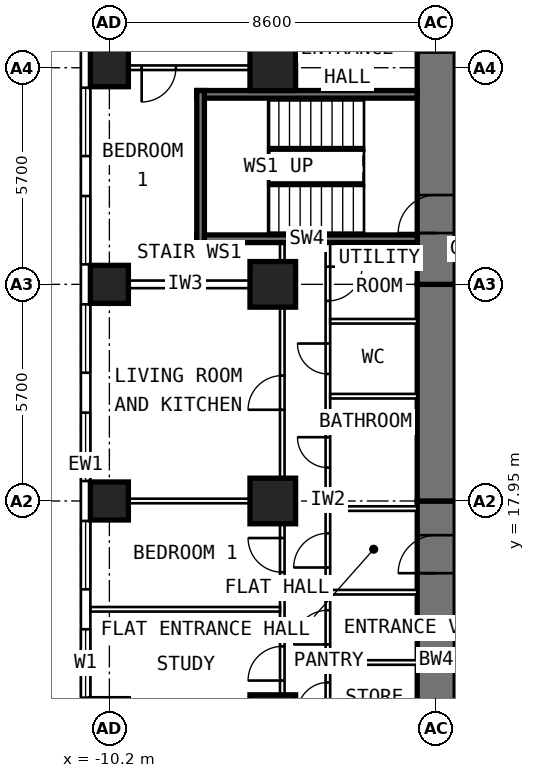
"""IFC4 building model, lengths in metres.
Left out: names, types, materials, properties, quantities, classifications, styles, units other than length and angle.
Written with IfcOpenShell. Run it as: python <this file> out.ifc"""

import sys

from ifc_helpers import new_model, si_unit, direction, frame, frame_2d, origin, origin_2d, place, context, subcontext, project, spatial, rectangle, extrude, element, fill, save


model = new_model("IFC4")
c1 = context("Model", 3, precision=1e-05, world=origin(), true_north=direction((0.0, 1.0)))
c2 = subcontext(c1, "Body", "Model", "MODEL_VIEW")
j1 = project(units=[si_unit("LENGTHUNIT", "METRE"), si_unit("PLANEANGLEUNIT", "RADIAN")], contexts=[c1])
p1 = place(None, origin())
s1 = spatial("IfcSite", under=j1, at=p1, CompositionType="ELEMENT")
p2 = place(p1, origin())
s2 = spatial("IfcBuilding", under=s1, at=p2, CompositionType="ELEMENT")
p3 = place(p2, frame((0.0, 0.0, 53.8)))
s3 = spatial("IfcBuildingStorey", under=s2, at=p3, CompositionType="ELEMENT", Elevation=53.8)
for number, where, z_axis, x_axis in (
    (1, (-10.2, 17.95, 0.0), (0.0, 0.0, 1.0), (0.0, 1.0, 0.0)),
    (2, (-10.2, 23.65, 0.0), (0.0, 0.0, 1.0), (0.0, 1.0, 0.0)),
    (3, (-10.2, 29.35, 0.0), (0.0, 0.0, 1.0), (0.0, 1.0, 0.0)),
):
    element("IfcColumn", number, at=place(p3, frame(where, z_axis=z_axis, x_axis=x_axis)), inside=s3, PredefinedType="COLUMN", context=c2, shape_type="SweptSolid", body=[
        extrude(rectangle(XDim=1.0, YDim=1.0, at=origin_2d()), origin(), (0.0, 0.0, 1.0), 3.6),
    ])
for number, where, z_axis, x_axis in (
    (4, (-5.9, 12.25, 0.0), (0.0, 0.0, 1.0), (0.0, 1.0, 0.0)),
    (5, (-5.9, 17.95, 0.0), (0.0, 0.0, 1.0), (0.0, 1.0, 0.0)),
    (6, (-5.9, 23.65, 0.0), (0.0, 0.0, 1.0), (0.0, 1.0, 0.0)),
    (7, (-5.9, 29.35, 0.0), (0.0, 0.0, 1.0), (0.0, 1.0, 0.0)),
):
    element("IfcColumn", number, at=place(p3, frame(where, z_axis=z_axis, x_axis=x_axis)), inside=s3, PredefinedType="COLUMN", context=c2, shape_type="SweptSolid", body=[
        extrude(rectangle(XDim=1.2, YDim=1.2, at=origin_2d()), origin(), (0.0, 0.0, 1.0), 3.6),
    ])
p4 = place(p3, frame((-1.6, 9.6, 0.0), z_axis=(0.0, 0.0, 1.0), x_axis=(0.0, 1.0, 0.0)))
e8 = element("IfcWall", 8, at=p4, inside=s3, PredefinedType="SHEAR", context=c2, shape_type="SweptSolid", body=[
    extrude(rectangle(XDim=8.35, YDim=1.0, at=frame_2d((4.175, 0.0))), origin(), (0.0, 0.0, 1.0), 3.6),
])
p5 = place(p4, frame((6.45, 0.0, 0.0)))
e9 = element("IfcOpeningElement", 9, at=p5, cuts=e8, PredefinedType="OPENING", context=c2, shape_type="SweptSolid", body=[
    extrude(rectangle(XDim=1.0, YDim=2.1, at=frame_2d((0.5, 1.05))), frame((0.0, 0.512, 0.0), z_axis=(0.0, -1.0, 0.0), x_axis=(1.0, 0.0, 0.0)), (0.0, 0.0, 1.0), 1.024),
])
p6 = place(p3, frame((-1.6, 17.95, 0.0), z_axis=(0.0, 0.0, 1.0), x_axis=(0.0, 1.0, 0.0)))
e10 = element("IfcWall", 10, at=p6, inside=s3, PredefinedType="SHEAR", context=c2, shape_type="SweptSolid", body=[
    extrude(rectangle(XDim=5.7, YDim=1.0, at=frame_2d((2.85, 0.0))), origin(), (0.0, 0.0, 1.0), 3.6),
])
p7 = place(p3, frame((-1.6, 23.65, 0.0), z_axis=(0.0, 0.0, 1.0), x_axis=(0.0, 1.0, 0.0)))
e11 = element("IfcWall", 11, at=p7, inside=s3, PredefinedType="SHEAR", context=c2, shape_type="SweptSolid", body=[
    extrude(rectangle(XDim=10.745, YDim=1.0, at=frame_2d((5.373, 0.0))), origin(), (0.0, 0.0, 1.0), 3.6),
])
p8 = place(p7, frame((6.1, 0.0, 0.0)))
e12 = element("IfcOpeningElement", 12, at=p8, cuts=e11, PredefinedType="OPENING", context=c2, shape_type="SweptSolid", body=[
    extrude(rectangle(XDim=1.0, YDim=2.1, at=frame_2d((0.5, 1.05))), frame((0.0, 0.512, 0.0), z_axis=(0.0, -1.0, 0.0), x_axis=(1.0, 0.0, 0.0)), (0.0, 0.0, 1.0), 1.024),
])
p9 = place(p7, frame((1.35, 0.0, 0.0)))
e13 = element("IfcOpeningElement", 13, at=p9, cuts=e11, PredefinedType="OPENING", context=c2, shape_type="SweptSolid", body=[
    extrude(rectangle(XDim=1.0, YDim=2.1, at=frame_2d((0.5, 1.05))), frame((0.0, 0.512, 0.0), z_axis=(0.0, -1.0, 0.0), x_axis=(1.0, 0.0, 0.0)), (0.0, 0.0, 1.0), 1.024),
])
p10 = place(p3, frame((-10.825, 6.148, 0.0), z_axis=(0.0, 0.0, 1.0), x_axis=(0.0, 1.0, 0.0)))
e14 = element("IfcWall", 14, at=p10, inside=s3, PredefinedType="SOLIDWALL", context=c2, shape_type="SweptSolid", body=[
    extrude(rectangle(XDim=25.487, YDim=0.25, at=frame_2d((12.744, 0.0))), origin(), (0.0, 0.0, 1.0), 3.35),
])
p11 = place(p10, frame((0.927, 0.0, 0.8)))
e15 = element("IfcOpeningElement", 15, at=p11, cuts=e14, PredefinedType="OPENING", context=c2, shape_type="SweptSolid", body=[
    extrude(rectangle(XDim=1.8, YDim=1.8, at=frame_2d((0.9, 0.9))), frame((0.0, 0.137, 0.0), z_axis=(0.0, -1.0, 0.0), x_axis=(1.0, 0.0, 0.0)), (0.0, 0.0, 1.0), 0.274),
])
p12 = place(p10, frame((3.777, 0.0, 0.8)))
e16 = element("IfcOpeningElement", 16, at=p12, cuts=e14, PredefinedType="OPENING", context=c2, shape_type="SweptSolid", body=[
    extrude(rectangle(XDim=1.8, YDim=1.8, at=frame_2d((0.9, 0.9))), frame((0.0, 0.137, 0.0), z_axis=(0.0, -1.0, 0.0), x_axis=(1.0, 0.0, 0.0)), (0.0, 0.0, 1.0), 0.274),
])
p13 = place(p10, frame((6.627, 0.0, 0.8)))
e17 = element("IfcOpeningElement", 17, at=p13, cuts=e14, PredefinedType="OPENING", context=c2, shape_type="SweptSolid", body=[
    extrude(rectangle(XDim=1.8, YDim=1.8, at=frame_2d((0.9, 0.9))), frame((0.0, 0.137, 0.0), z_axis=(0.0, -1.0, 0.0), x_axis=(1.0, 0.0, 0.0)), (0.0, 0.0, 1.0), 0.274),
])
p14 = place(p10, frame((9.477, 0.0, 0.8)))
e18 = element("IfcOpeningElement", 18, at=p14, cuts=e14, PredefinedType="OPENING", context=c2, shape_type="SweptSolid", body=[
    extrude(rectangle(XDim=1.8, YDim=1.8, at=frame_2d((0.9, 0.9))), frame((0.0, 0.137, 0.0), z_axis=(0.0, -1.0, 0.0), x_axis=(1.0, 0.0, 0.0)), (0.0, 0.0, 1.0), 0.274),
])
p15 = place(p10, frame((12.327, 0.0, 0.8)))
e19 = element("IfcOpeningElement", 19, at=p15, cuts=e14, PredefinedType="OPENING", context=c2, shape_type="SweptSolid", body=[
    extrude(rectangle(XDim=1.8, YDim=1.8, at=frame_2d((0.9, 0.9))), frame((0.0, 0.137, 0.0), z_axis=(0.0, -1.0, 0.0), x_axis=(1.0, 0.0, 0.0)), (0.0, 0.0, 1.0), 0.274),
])
p16 = place(p10, frame((15.177, 0.0, 0.8)))
e20 = element("IfcOpeningElement", 20, at=p16, cuts=e14, PredefinedType="OPENING", context=c2, shape_type="SweptSolid", body=[
    extrude(rectangle(XDim=1.8, YDim=1.8, at=frame_2d((0.9, 0.9))), frame((0.0, 0.137, 0.0), z_axis=(0.0, -1.0, 0.0), x_axis=(1.0, 0.0, 0.0)), (0.0, 0.0, 1.0), 0.274),
])
p17 = place(p10, frame((18.027, 0.0, 0.8)))
e21 = element("IfcOpeningElement", 21, at=p17, cuts=e14, PredefinedType="OPENING", context=c2, shape_type="SweptSolid", body=[
    extrude(rectangle(XDim=1.8, YDim=1.8, at=frame_2d((0.9, 0.9))), frame((0.0, 0.137, 0.0), z_axis=(0.0, -1.0, 0.0), x_axis=(1.0, 0.0, 0.0)), (0.0, 0.0, 1.0), 0.274),
])
p18 = place(p10, frame((20.877, 0.0, 0.8)))
e22 = element("IfcOpeningElement", 22, at=p18, cuts=e14, PredefinedType="OPENING", context=c2, shape_type="SweptSolid", body=[
    extrude(rectangle(XDim=1.8, YDim=1.8, at=frame_2d((0.9, 0.9))), frame((0.0, 0.137, 0.0), z_axis=(0.0, -1.0, 0.0), x_axis=(1.0, 0.0, 0.0)), (0.0, 0.0, 1.0), 0.274),
])
p19 = place(p3, frame((-4.45, 10.1, 0.0), z_axis=(0.0, 0.0, 1.0), x_axis=(0.0, 1.0, 0.0)))
e23 = element("IfcWall", 23, at=p19, inside=s3, PredefinedType="PARTITIONING", context=c2, shape_type="SweptSolid", body=[
    extrude(rectangle(XDim=14.65, YDim=0.12, at=frame_2d((7.325, 0.0))), origin(), (0.0, 0.0, 1.0), 3.35),
])
p20 = place(p19, frame((0.375, 0.0, 0.0)))
e24 = element("IfcOpeningElement", 24, at=p20, cuts=e23, PredefinedType="OPENING", context=c2, shape_type="SweptSolid", body=[
    extrude(rectangle(XDim=0.9, YDim=2.1, at=frame_2d((0.45, 1.05))), frame((0.0, 0.072, 0.0), z_axis=(0.0, -1.0, 0.0), x_axis=(1.0, 0.0, 0.0)), (0.0, 0.0, 1.0), 0.144),
])
p21 = place(p19, frame((2.275, 0.0, 0.0)))
e25 = element("IfcOpeningElement", 25, at=p21, cuts=e23, PredefinedType="OPENING", context=c2, shape_type="SweptSolid", body=[
    extrude(rectangle(XDim=0.8, YDim=2.1, at=frame_2d((0.4, 1.05))), frame((0.0, 0.072, 0.0), z_axis=(0.0, -1.0, 0.0), x_axis=(1.0, 0.0, 0.0)), (0.0, 0.0, 1.0), 0.144),
])
p22 = place(p19, frame((4.075, 0.0, 0.0)))
e26 = element("IfcOpeningElement", 26, at=p22, cuts=e23, PredefinedType="OPENING", context=c2, shape_type="SweptSolid", body=[
    extrude(rectangle(XDim=0.9, YDim=2.1, at=frame_2d((0.45, 1.05))), frame((0.0, 0.072, 0.0), z_axis=(0.0, -1.0, 0.0), x_axis=(1.0, 0.0, 0.0)), (0.0, 0.0, 1.0), 0.144),
])
p23 = place(p19, frame((6.1, 0.0, 0.0)))
e27 = element("IfcOpeningElement", 27, at=p23, cuts=e23, PredefinedType="OPENING", context=c2, shape_type="SweptSolid", body=[
    extrude(rectangle(XDim=0.9, YDim=2.1, at=frame_2d((0.45, 1.05))), frame((0.0, 0.072, 0.0), z_axis=(0.0, -1.0, 0.0), x_axis=(1.0, 0.0, 0.0)), (0.0, 0.0, 1.0), 0.144),
])
p24 = place(p19, frame((8.729, 0.0, 0.0)))
e28 = element("IfcOpeningElement", 28, at=p24, cuts=e23, PredefinedType="OPENING", context=c2, shape_type="SweptSolid", body=[
    extrude(rectangle(XDim=0.8, YDim=2.1, at=frame_2d((0.4, 1.05))), frame((0.0, 0.072, 0.0), z_axis=(0.0, -1.0, 0.0), x_axis=(1.0, 0.0, 0.0)), (0.0, 0.0, 1.0), 0.144),
])
p25 = place(p19, frame((11.193, 0.0, 0.0)))
e29 = element("IfcOpeningElement", 29, at=p25, cuts=e23, PredefinedType="OPENING", context=c2, shape_type="SweptSolid", body=[
    extrude(rectangle(XDim=0.8, YDim=2.1, at=frame_2d((0.4, 1.05))), frame((0.0, 0.072, 0.0), z_axis=(0.0, -1.0, 0.0), x_axis=(1.0, 0.0, 0.0)), (0.0, 0.0, 1.0), 0.144),
])
p26 = place(p19, frame((13.114, 0.0, 0.0)))
e30 = element("IfcOpeningElement", 30, at=p26, cuts=e23, PredefinedType="OPENING", context=c2, shape_type="SweptSolid", body=[
    extrude(rectangle(XDim=0.9, YDim=2.1, at=frame_2d((0.45, 1.05))), frame((0.0, 0.072, 0.0), z_axis=(0.0, -1.0, 0.0), x_axis=(1.0, 0.0, 0.0)), (0.0, 0.0, 1.0), 0.144),
])
p27 = place(p3, frame((-5.65, 9.6, 0.0), z_axis=(0.0, 0.0, 1.0), x_axis=(0.0, 1.0, 0.0)))
e31 = element("IfcWall", 31, at=p27, inside=s3, PredefinedType="PARTITIONING", context=c2, shape_type="SweptSolid", body=[
    extrude(rectangle(XDim=15.15, YDim=0.12, at=frame_2d((7.575, 0.0))), origin(), (0.0, 0.0, 1.0), 3.35),
])
p28 = place(p27, frame((1.0, 0.0, 0.0)))
e32 = element("IfcOpeningElement", 32, at=p28, cuts=e31, PredefinedType="OPENING", context=c2, shape_type="SweptSolid", body=[
    extrude(rectangle(XDim=0.9, YDim=2.1, at=frame_2d((0.45, 1.05))), frame((0.0, 0.072, 0.0), z_axis=(0.0, -1.0, 0.0), x_axis=(1.0, 0.0, 0.0)), (0.0, 0.0, 1.0), 0.144),
])
p29 = place(p27, frame((3.625, 0.0, 0.0)))
e33 = element("IfcOpeningElement", 33, at=p29, cuts=e31, PredefinedType="OPENING", context=c2, shape_type="SweptSolid", body=[
    extrude(rectangle(XDim=0.9, YDim=2.1, at=frame_2d((0.45, 1.05))), frame((0.0, 0.072, 0.0), z_axis=(0.0, -1.0, 0.0), x_axis=(1.0, 0.0, 0.0)), (0.0, 0.0, 1.0), 0.144),
])
p30 = place(p27, frame((6.475, 0.0, 0.0)))
e34 = element("IfcOpeningElement", 34, at=p30, cuts=e31, PredefinedType="OPENING", context=c2, shape_type="SweptSolid", body=[
    extrude(rectangle(XDim=0.9, YDim=2.1, at=frame_2d((0.45, 1.05))), frame((0.0, 0.072, 0.0), z_axis=(0.0, -1.0, 0.0), x_axis=(1.0, 0.0, 0.0)), (0.0, 0.0, 1.0), 0.144),
])
p31 = place(p27, frame((10.75, 0.0, 0.0)))
e35 = element("IfcOpeningElement", 35, at=p31, cuts=e31, PredefinedType="OPENING", context=c2, shape_type="SweptSolid", body=[
    extrude(rectangle(XDim=0.9, YDim=2.1, at=frame_2d((0.45, 1.05))), frame((0.0, 0.072, 0.0), z_axis=(0.0, -1.0, 0.0), x_axis=(1.0, 0.0, 0.0)), (0.0, 0.0, 1.0), 0.144),
])
p32 = place(p3, frame((-5.71, 15.1, 0.0), z_axis=(0.0, 0.0, 1.0), x_axis=(-1.0, 0.0, 0.0)))
e36 = element("IfcWall", 36, at=p32, inside=s3, PredefinedType="PARTITIONING", context=c2, shape_type="SweptSolid", body=[
    extrude(rectangle(XDim=4.99, YDim=0.12, at=frame_2d((2.495, 0.0))), origin(), (0.0, 0.0, 1.0), 3.35),
])
p33 = place(p3, frame((-5.71, 17.95, 0.0), z_axis=(0.0, 0.0, 1.0), x_axis=(-1.0, 0.0, 0.0)))
e37 = element("IfcWall", 37, at=p33, inside=s3, PredefinedType="PARTITIONING", context=c2, shape_type="SweptSolid", body=[
    extrude(rectangle(XDim=4.99, YDim=0.12, at=frame_2d((2.495, 0.0))), origin(), (0.0, 0.0, 1.0), 2.45),
])
for number, where, z_axis, x_axis in (
    (38, (-2.1, 13.7, 0.0), (0.0, 0.0, 1.0), (-1.0, 0.0, 0.0)),
    (39, (-2.1, 15.55, 0.0), (0.0, 0.0, 1.0), (-1.0, 0.0, 0.0)),
):
    element("IfcWall", number, at=place(p3, frame(where, z_axis=z_axis, x_axis=x_axis)), inside=s3, PredefinedType="PARTITIONING", context=c2, shape_type="SweptSolid", body=[
        extrude(rectangle(XDim=2.29, YDim=0.12, at=frame_2d((1.145, 0.0))), origin(), (0.0, 0.0, 1.0), 3.35),
    ])
p34 = place(p3, frame((-2.1, 17.75, 0.0), z_axis=(0.0, 0.0, 1.0), x_axis=(-1.0, 0.0, 0.0)))
e40 = element("IfcWall", 40, at=p34, inside=s3, PredefinedType="PARTITIONING", context=c2, shape_type="SweptSolid", body=[
    extrude(rectangle(XDim=2.29, YDim=0.12, at=frame_2d((1.145, 0.0))), origin(), (0.0, 0.0, 1.0), 2.45),
])
for number, where, z_axis, x_axis in (
    (41, (-2.1, 20.707, 0.0), (0.0, 0.0, 1.0), (-1.0, 0.0, 0.0)),
    (42, (-2.1, 22.678, 0.0), (0.0, 0.0, 1.0), (-1.0, 0.0, 0.0)),
):
    element("IfcWall", number, at=place(p3, frame(where, z_axis=z_axis, x_axis=x_axis)), inside=s3, PredefinedType="PARTITIONING", context=c2, shape_type="SweptSolid", body=[
        extrude(rectangle(XDim=2.29, YDim=0.12, at=frame_2d((1.145, 0.0))), origin(), (0.0, 0.0, 1.0), 3.35),
    ])
p35 = place(p3, frame((-5.71, 23.65, 0.0), z_axis=(0.0, 0.0, 1.0), x_axis=(-1.0, 0.0, 0.0)))
e43 = element("IfcWall", 43, at=p35, inside=s3, PredefinedType="PARTITIONING", context=c2, shape_type="SweptSolid", body=[
    extrude(rectangle(XDim=4.99, YDim=0.2, at=frame_2d((2.495, 0.0))), origin(), (0.0, 0.0, 1.0), 2.45),
])
p36 = place(p3, frame((-5.71, 29.35, 0.0), z_axis=(0.0, 0.0, 1.0), x_axis=(-1.0, 0.0, 0.0)))
e44 = element("IfcWall", 44, at=p36, inside=s3, PredefinedType="PARTITIONING", context=c2, shape_type="SweptSolid", body=[
    extrude(rectangle(XDim=4.99, YDim=0.12, at=frame_2d((2.495, 0.0))), origin(), (0.0, 0.0, 1.0), 2.45),
])
p37 = place(p36, frame((2.74, 0.0, 0.0)))
e45 = element("IfcOpeningElement", 45, at=p37, cuts=e44, PredefinedType="OPENING", context=c2, shape_type="SweptSolid", body=[
    extrude(rectangle(XDim=0.9, YDim=2.1, at=frame_2d((0.45, 1.05))), frame((0.0, 0.072, 0.0), z_axis=(0.0, -1.0, 0.0), x_axis=(1.0, 0.0, 0.0)), (0.0, 0.0, 1.0), 0.144),
])
p38 = place(p3, frame((-5.65, 28.95, 0.0), z_axis=(0.0, 0.0, 1.0), x_axis=(0.0, 1.0, 0.0)))
e46 = element("IfcWall", 46, at=p38, inside=s3, PredefinedType="PARTITIONING", context=c2, shape_type="SweptSolid", body=[
    extrude(rectangle(XDim=5.445, YDim=0.12, at=frame_2d((2.723, 0.0))), origin(), (0.0, 0.0, 1.0), 3.35),
])
p39 = place(p38, frame((1.15, 0.0, 0.0)))
e47 = element("IfcOpeningElement", 47, at=p39, cuts=e46, PredefinedType="OPENING", context=c2, shape_type="SweptSolid", body=[
    extrude(rectangle(XDim=0.9, YDim=2.1, at=frame_2d((0.45, 1.05))), frame((0.0, 0.072, 0.0), z_axis=(0.0, -1.0, 0.0), x_axis=(1.0, 0.0, 0.0)), (0.0, 0.0, 1.0), 0.144),
])
for number, where, z_axis, x_axis in (
    (48, (-2.1, 24.85, 0.0), (0.0, 0.0, 1.0), (-1.0, 0.0, 0.0)),
    (49, (-2.1, 28.65, 0.0), (0.0, 0.0, 1.0), (-1.0, 0.0, 0.0)),
):
    element("IfcWall", number, at=place(p3, frame(where, z_axis=z_axis, x_axis=x_axis)), inside=s3, PredefinedType="SHEAR", context=c2, shape_type="SweptSolid", body=[
        extrude(rectangle(XDim=5.8, YDim=0.2, at=frame_2d((2.9, 0.0))), origin(), (0.0, 0.0, 1.0), 3.33),
    ])
p40 = place(p3, frame((-7.8, 24.75, 0.0), z_axis=(0.0, 0.0, 1.0), x_axis=(0.0, 1.0, 0.0)))
e50 = element("IfcWall", 50, at=p40, inside=s3, PredefinedType="SHEAR", context=c2, shape_type="SweptSolid", body=[
    extrude(rectangle(XDim=4.0, YDim=0.2, at=frame_2d((2.0, 0.0))), origin(), (0.0, 0.0, 1.0), 3.33),
])
p41 = place(p13, origin())
e51 = element("IfcWindow", 51, at=p41, inside=s3, PartitioningType="SINGLE_PANEL", PredefinedType="WINDOW", context=c2, shape_type="SweptSolid", body=[
    extrude(rectangle(XDim=1.8, YDim=1.8, at=frame_2d((0.9, 0.9))), frame((0.0, 0.03, 0.0), z_axis=(0.0, -1.0, 0.0), x_axis=(1.0, 0.0, 0.0)), (0.0, 0.0, 1.0), 0.06),
])
fill(e17, e51)
p42 = place(p14, origin())
e52 = element("IfcWindow", 52, at=p42, inside=s3, PartitioningType="SINGLE_PANEL", PredefinedType="WINDOW", context=c2, shape_type="SweptSolid", body=[
    extrude(rectangle(XDim=1.8, YDim=1.8, at=frame_2d((0.9, 0.9))), frame((0.0, 0.03, 0.0), z_axis=(0.0, -1.0, 0.0), x_axis=(1.0, 0.0, 0.0)), (0.0, 0.0, 1.0), 0.06),
])
fill(e18, e52)
p43 = place(p15, origin())
e53 = element("IfcWindow", 53, at=p43, inside=s3, PartitioningType="SINGLE_PANEL", PredefinedType="WINDOW", context=c2, shape_type="SweptSolid", body=[
    extrude(rectangle(XDim=1.8, YDim=1.8, at=frame_2d((0.9, 0.9))), frame((0.0, 0.03, 0.0), z_axis=(0.0, -1.0, 0.0), x_axis=(1.0, 0.0, 0.0)), (0.0, 0.0, 1.0), 0.06),
])
fill(e19, e53)
p44 = place(p16, origin())
e54 = element("IfcWindow", 54, at=p44, inside=s3, PartitioningType="SINGLE_PANEL", PredefinedType="WINDOW", context=c2, shape_type="SweptSolid", body=[
    extrude(rectangle(XDim=1.8, YDim=1.8, at=frame_2d((0.9, 0.9))), frame((0.0, 0.03, 0.0), z_axis=(0.0, -1.0, 0.0), x_axis=(1.0, 0.0, 0.0)), (0.0, 0.0, 1.0), 0.06),
])
fill(e20, e54)
p45 = place(p17, origin())
e55 = element("IfcWindow", 55, at=p45, inside=s3, PartitioningType="SINGLE_PANEL", PredefinedType="WINDOW", context=c2, shape_type="SweptSolid", body=[
    extrude(rectangle(XDim=1.8, YDim=1.8, at=frame_2d((0.9, 0.9))), frame((0.0, 0.03, 0.0), z_axis=(0.0, -1.0, 0.0), x_axis=(1.0, 0.0, 0.0)), (0.0, 0.0, 1.0), 0.06),
])
fill(e21, e55)
p46 = place(p18, origin())
e56 = element("IfcWindow", 56, at=p46, inside=s3, PartitioningType="SINGLE_PANEL", PredefinedType="WINDOW", context=c2, shape_type="SweptSolid", body=[
    extrude(rectangle(XDim=1.8, YDim=1.8, at=frame_2d((0.9, 0.9))), frame((0.0, 0.03, 0.0), z_axis=(0.0, -1.0, 0.0), x_axis=(1.0, 0.0, 0.0)), (0.0, 0.0, 1.0), 0.06),
])
fill(e22, e56)
p47 = place(p5, origin())
e57 = element("IfcDoor", 57, at=p47, inside=s3, OperationType="SINGLE_SWING_LEFT", PredefinedType="DOOR", context=c2, shape_type="SweptSolid", body=[
    extrude(rectangle(XDim=1.0, YDim=2.1, at=frame_2d((0.5, 1.05))), frame((0.0, 0.25, 0.0), z_axis=(0.0, -1.0, 0.0), x_axis=(1.0, 0.0, 0.0)), (0.0, 0.0, 1.0), 0.5),
])
fill(e9, e57)
p48 = place(p29, origin())
e58 = element("IfcDoor", 58, at=p48, inside=s3, OperationType="SINGLE_SWING_LEFT", PredefinedType="DOOR", context=c2, shape_type="SweptSolid", body=[
    extrude(rectangle(XDim=0.9, YDim=2.1, at=frame_2d((0.45, 1.05))), frame((0.0, 0.025, 0.0), z_axis=(0.0, -1.0, 0.0), x_axis=(1.0, 0.0, 0.0)), (0.0, 0.0, 1.0), 0.05),
])
fill(e33, e58)
p49 = place(p30, origin())
e59 = element("IfcDoor", 59, at=p49, inside=s3, OperationType="SINGLE_SWING_RIGHT", PredefinedType="DOOR", context=c2, shape_type="SweptSolid", body=[
    extrude(rectangle(XDim=0.9, YDim=2.1, at=frame_2d((0.45, 1.05))), frame((0.0, 0.025, 0.0), z_axis=(0.0, -1.0, 0.0), x_axis=(1.0, 0.0, 0.0)), (0.0, 0.0, 1.0), 0.05),
])
fill(e34, e59)
p50 = place(p31, origin())
e60 = element("IfcDoor", 60, at=p50, inside=s3, OperationType="SINGLE_SWING_LEFT", PredefinedType="DOOR", context=c2, shape_type="SweptSolid", body=[
    extrude(rectangle(XDim=0.9, YDim=2.1, at=frame_2d((0.45, 1.05))), frame((0.0, 0.025, 0.0), z_axis=(0.0, -1.0, 0.0), x_axis=(1.0, 0.0, 0.0)), (0.0, 0.0, 1.0), 0.05),
])
fill(e35, e60)
p51 = place(p21, origin())
e61 = element("IfcDoor", 61, at=p51, inside=s3, OperationType="SINGLE_SWING_LEFT", PredefinedType="DOOR", context=c2, shape_type="SweptSolid", body=[
    extrude(rectangle(XDim=0.8, YDim=2.1, at=frame_2d((0.4, 1.05))), frame((0.0, 0.025, 0.0), z_axis=(0.0, -1.0, 0.0), x_axis=(1.0, 0.0, 0.0)), (0.0, 0.0, 1.0), 0.05),
])
fill(e25, e61)
p52 = place(p22, origin())
e62 = element("IfcDoor", 62, at=p52, inside=s3, OperationType="SINGLE_SWING_LEFT", PredefinedType="DOOR", context=c2, shape_type="SweptSolid", body=[
    extrude(rectangle(XDim=0.9, YDim=2.1, at=frame_2d((0.45, 1.05))), frame((0.0, 0.025, 0.0), z_axis=(0.0, -1.0, 0.0), x_axis=(1.0, 0.0, 0.0)), (0.0, 0.0, 1.0), 0.05),
])
fill(e26, e62)
p53 = place(p23, origin())
e63 = element("IfcDoor", 63, at=p53, inside=s3, OperationType="SINGLE_SWING_LEFT", PredefinedType="DOOR", context=c2, shape_type="SweptSolid", body=[
    extrude(rectangle(XDim=0.9, YDim=2.1, at=frame_2d((0.45, 1.05))), frame((0.0, 0.025, 0.0), z_axis=(0.0, -1.0, 0.0), x_axis=(1.0, 0.0, 0.0)), (0.0, 0.0, 1.0), 0.05),
])
fill(e27, e63)
p54 = place(p24, origin())
e64 = element("IfcDoor", 64, at=p54, inside=s3, OperationType="SINGLE_SWING_RIGHT", PredefinedType="DOOR", context=c2, shape_type="SweptSolid", body=[
    extrude(rectangle(XDim=0.8, YDim=2.1, at=frame_2d((0.4, 1.05))), frame((0.0, 0.025, 0.0), z_axis=(0.0, -1.0, 0.0), x_axis=(1.0, 0.0, 0.0)), (0.0, 0.0, 1.0), 0.05),
])
fill(e28, e64)
p55 = place(p25, origin())
e65 = element("IfcDoor", 65, at=p55, inside=s3, OperationType="SINGLE_SWING_RIGHT", PredefinedType="DOOR", context=c2, shape_type="SweptSolid", body=[
    extrude(rectangle(XDim=0.8, YDim=2.1, at=frame_2d((0.4, 1.05))), frame((0.0, 0.025, 0.0), z_axis=(0.0, -1.0, 0.0), x_axis=(1.0, 0.0, 0.0)), (0.0, 0.0, 1.0), 0.05),
])
fill(e29, e65)
p56 = place(p26, frame((0.9, 0.0, 0.0), z_axis=(0.0, 0.0, 1.0), x_axis=(-1.0, 0.0, 0.0)))
e66 = element("IfcDoor", 66, at=p56, inside=s3, OperationType="SINGLE_SWING_LEFT", PredefinedType="DOOR", context=c2, shape_type="SweptSolid", body=[
    extrude(rectangle(XDim=0.9, YDim=2.1, at=frame_2d((0.45, 1.05))), frame((0.0, 0.025, 0.0), z_axis=(0.0, -1.0, 0.0), x_axis=(1.0, 0.0, 0.0)), (0.0, 0.0, 1.0), 0.05),
])
fill(e30, e66)
p57 = place(p37, origin())
e67 = element("IfcDoor", 67, at=p57, inside=s3, OperationType="SINGLE_SWING_RIGHT", PredefinedType="DOOR", context=c2, shape_type="SweptSolid", body=[
    extrude(rectangle(XDim=0.9, YDim=2.1, at=frame_2d((0.45, 1.05))), frame((0.0, 0.025, 0.0), z_axis=(0.0, -1.0, 0.0), x_axis=(1.0, 0.0, 0.0)), (0.0, 0.0, 1.0), 0.05),
])
fill(e45, e67)
p58 = place(p9, origin())
e68 = element("IfcDoor", 68, at=p58, inside=s3, OperationType="SINGLE_SWING_LEFT", PredefinedType="DOOR", context=c2, shape_type="SweptSolid", body=[
    extrude(rectangle(XDim=1.0, YDim=2.1, at=frame_2d((0.5, 1.05))), frame((0.0, 0.25, 0.0), z_axis=(0.0, -1.0, 0.0), x_axis=(1.0, 0.0, 0.0)), (0.0, 0.0, 1.0), 0.5),
])
fill(e13, e68)
save(model, sys.argv[1])
